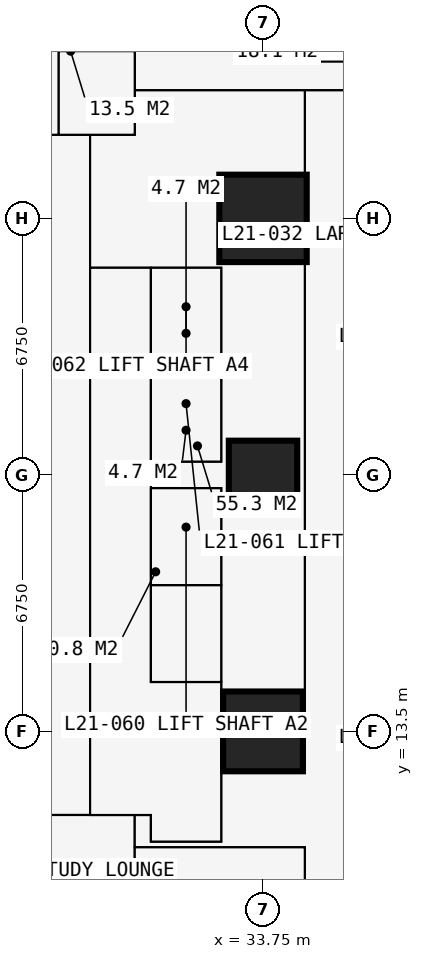
"""IFC4 building model, lengths in metres.
Left out: names, types, materials, properties, quantities, classifications, styles, units other than length and angle.
Written with IfcOpenShell. Run it as: python <this file> out.ifc"""

import sys

from ifc_helpers import new_model, si_unit, direction, frame, frame_2d, origin, origin_2d, place, context, subcontext, project, spatial, rectangle, extrude, element, fill, save


model = new_model("IFC4")
c1 = context("Model", 3, precision=1e-05, world=origin(), true_north=direction((0.0, 1.0)))
c2 = subcontext(c1, "Body", "Model", "MODEL_VIEW")
j1 = project(units=[si_unit("LENGTHUNIT", "METRE"), si_unit("PLANEANGLEUNIT", "RADIAN")], contexts=[c1])
p1 = place(None, origin())
s1 = spatial("IfcSite", under=j1, at=p1, CompositionType="ELEMENT")
p2 = place(p1, origin())
s2 = spatial("IfcBuilding", under=s1, at=p2, CompositionType="ELEMENT")
p3 = place(p2, frame((0.0, 0.0, 80.1)))
s3 = spatial("IfcBuildingStorey", under=s2, at=p3, CompositionType="ELEMENT", Elevation=80.1)
p4 = place(p3, frame((33.75, 13.5, 0.0), z_axis=(0.0, 0.0, 1.0), x_axis=(1.0, 0.0, 0.0)))
e1 = element("IfcColumn", 1, at=p4, inside=s3, PredefinedType="COLUMN", context=c2, shape_type="SweptSolid", body=[
    extrude(rectangle(XDim=2.1, YDim=2.1, at=origin_2d()), origin(), (0.0, 0.0, 1.0), 3.6),
])
p5 = place(p3, frame((33.75, 20.25, 0.0), z_axis=(0.0, 0.0, 1.0), x_axis=(1.0, 0.0, 0.0)))
e2 = element("IfcColumn", 2, at=p5, inside=s3, PredefinedType="COLUMN", context=c2, shape_type="SweptSolid", body=[
    extrude(rectangle(XDim=1.8, YDim=1.8, at=origin_2d()), origin(), (0.0, 0.0, 1.0), 3.6),
])
p6 = place(p3, frame((33.75, 27.0, 0.0), z_axis=(0.0, 0.0, 1.0), x_axis=(1.0, 0.0, 0.0)))
e3 = element("IfcColumn", 3, at=p6, inside=s3, PredefinedType="COLUMN", context=c2, shape_type="SweptSolid", body=[
    extrude(rectangle(XDim=2.3, YDim=2.3, at=origin_2d()), origin(), (0.0, 0.0, 1.0), 3.6),
])
p7 = place(p3, frame((37.875, 31.125, 0.0), z_axis=(0.0, 0.0, 1.0), x_axis=(-1.0, 0.0, 0.0)))
e4 = element("IfcWall", 4, at=p7, inside=s3, PredefinedType="SOLIDWALL", context=c2, shape_type="SweptSolid", body=[
    extrude(rectangle(XDim=3.375, YDim=0.3, at=frame_2d((1.688, 0.0))), origin(), (0.0, 0.0, 1.0), 3.375),
])
p8 = place(p7, frame((0.788, 0.0, 0.6)))
e5 = element("IfcOpeningElement", 5, at=p8, cuts=e4, PredefinedType="OPENING", context=c2, shape_type="SweptSolid", body=[
    extrude(rectangle(XDim=1.8, YDim=2.1, at=frame_2d((0.9, 1.05))), frame((0.0, 0.16, 0.0), z_axis=(0.0, -1.0, 0.0), x_axis=(1.0, 0.0, 0.0)), (0.0, 0.0, 1.0), 0.32),
])
p9 = place(p3, frame((34.5, 31.125, 0.0), z_axis=(0.0, 0.0, 1.0), x_axis=(0.0, 1.0, 0.0)))
e6 = element("IfcWall", 6, at=p9, inside=s3, PredefinedType="SOLIDWALL", context=c2, shape_type="SweptSolid", body=[
    extrude(rectangle(XDim=3.375, YDim=0.3, at=frame_2d((1.688, 0.0))), origin(), (0.0, 0.0, 1.0), 3.375),
])
p10 = place(p9, frame((0.272, 0.0, 0.9)))
e7 = element("IfcOpeningElement", 7, at=p10, cuts=e6, PredefinedType="OPENING", context=c2, shape_type="SweptSolid", body=[
    extrude(rectangle(XDim=0.9, YDim=1.8, at=frame_2d((0.45, 0.9))), frame((0.0, 0.16, 0.0), z_axis=(0.0, -1.0, 0.0), x_axis=(1.0, 0.0, 0.0)), (0.0, 0.0, 1.0), 0.32),
])
p11 = place(p3, frame((10.125, 11.3, 0.0), z_axis=(0.0, 0.0, 1.0), x_axis=(1.0, 0.0, 0.0)))
e8 = element("IfcWall", 8, at=p11, inside=s3, PredefinedType="PARTITIONING", context=c2, shape_type="SweptSolid", body=[
    extrude(rectangle(XDim=20.675, YDim=0.15, at=frame_2d((10.337, 0.0))), origin(), (0.0, 0.0, 1.0), 3.375),
])
p12 = place(p11, frame((11.312, 0.0, 0.0)))
e9 = element("IfcOpeningElement", 9, at=p12, cuts=e8, PredefinedType="OPENING", context=c2, shape_type="SweptSolid", body=[
    extrude(rectangle(XDim=1.0, YDim=2.2, at=frame_2d((0.5, 1.1))), frame((0.0, 0.085, 0.0), z_axis=(0.0, -1.0, 0.0), x_axis=(1.0, 0.0, 0.0)), (0.0, 0.0, 1.0), 0.17),
])
p13 = place(p3, frame((11.3, 29.2, 0.0), z_axis=(0.0, 0.0, 1.0), x_axis=(1.0, 0.0, 0.0)))
e10 = element("IfcWall", 10, at=p13, inside=s3, PredefinedType="PARTITIONING", context=c2, shape_type="SweptSolid", body=[
    extrude(rectangle(XDim=19.075, YDim=0.1, at=frame_2d((9.538, 0.0))), origin(), (0.0, 0.0, 1.0), 3.375),
])
p14 = place(p13, frame((6.4, 0.0, 0.0)))
e11 = element("IfcOpeningElement", 11, at=p14, cuts=e10, PredefinedType="OPENING", context=c2, shape_type="SweptSolid", body=[
    extrude(rectangle(XDim=0.95, YDim=2.2, at=frame_2d((0.475, 1.1))), frame((0.0, 0.06, 0.0), z_axis=(0.0, -1.0, 0.0), x_axis=(1.0, 0.0, 0.0)), (0.0, 0.0, 1.0), 0.12),
])
p15 = place(p13, frame((13.15, 0.0, 0.0)))
e12 = element("IfcOpeningElement", 12, at=p15, cuts=e10, PredefinedType="OPENING", context=c2, shape_type="SweptSolid", body=[
    extrude(rectangle(XDim=0.95, YDim=2.2, at=frame_2d((0.475, 1.1))), frame((0.0, 0.06, 0.0), z_axis=(0.0, -1.0, 0.0), x_axis=(1.0, 0.0, 0.0)), (0.0, 0.0, 1.0), 0.12),
])
p16 = place(p13, frame((15.95, 0.0, 0.0)))
e13 = element("IfcOpeningElement", 13, at=p16, cuts=e10, PredefinedType="OPENING", context=c2, shape_type="SweptSolid", body=[
    extrude(rectangle(XDim=0.95, YDim=2.2, at=frame_2d((0.475, 1.1))), frame((0.0, 0.06, 0.0), z_axis=(0.0, -1.0, 0.0), x_axis=(1.0, 0.0, 0.0)), (0.0, 0.0, 1.0), 0.12),
])
p17 = place(p13, frame((0.6, 0.0, 0.0)))
e14 = element("IfcOpeningElement", 14, at=p17, cuts=e10, PredefinedType="OPENING", context=c2, shape_type="SweptSolid", body=[
    extrude(rectangle(XDim=1.0, YDim=2.2, at=frame_2d((0.5, 1.1))), frame((0.0, 0.06, 0.0), z_axis=(0.0, -1.0, 0.0), x_axis=(1.0, 0.0, 0.0)), (0.0, 0.0, 1.0), 0.12),
])
p18 = place(p3, frame((28.375, 29.2, 0.0), z_axis=(0.0, 0.0, 1.0), x_axis=(0.0, 1.0, 0.0)))
e15 = element("IfcWall", 15, at=p18, inside=s3, PredefinedType="PARTITIONING", context=c2, shape_type="SweptSolid", body=[
    extrude(rectangle(XDim=2.2, YDim=0.1, at=frame_2d((1.1, 0.0))), origin(), (0.0, 0.0, 1.0), 3.375),
])
p19 = place(p18, frame((0.65, 0.0, 0.0)))
e16 = element("IfcOpeningElement", 16, at=p19, cuts=e15, PredefinedType="OPENING", context=c2, shape_type="SweptSolid", body=[
    extrude(rectangle(XDim=0.9, YDim=2.2, at=frame_2d((0.45, 1.1))), frame((0.0, 0.06, 0.0), z_axis=(0.0, -1.0, 0.0), x_axis=(1.0, 0.0, 0.0)), (0.0, 0.0, 1.0), 0.12),
])
p20 = place(p3, frame((28.375, 31.4, 0.0), z_axis=(0.0, 0.0, 1.0), x_axis=(1.0, 0.0, 0.0)))
e17 = element("IfcWall", 17, at=p20, inside=s3, PredefinedType="PARTITIONING", context=c2, shape_type="SweptSolid", body=[
    extrude(rectangle(XDim=2.0, YDim=0.1, at=frame_2d((1.0, 0.0))), origin(), (0.0, 0.0, 1.0), 3.375),
])
p21 = place(p3, frame((29.2, 11.3, 0.0), z_axis=(0.0, 0.0, 1.0), x_axis=(0.0, 1.0, 0.0)))
e18 = element("IfcWall", 18, at=p21, inside=s3, PredefinedType="PARTITIONING", context=c2, shape_type="SweptSolid", body=[
    extrude(rectangle(XDim=17.9, YDim=0.2, at=frame_2d((8.95, 0.0))), origin(), (0.0, 0.0, 1.0), 3.375),
])
p22 = place(p21, frame((8.35, 0.0, 0.0)))
e19 = element("IfcOpeningElement", 19, at=p22, cuts=e18, PredefinedType="OPENING", context=c2, shape_type="SweptSolid", body=[
    extrude(rectangle(XDim=1.2, YDim=2.2, at=frame_2d((0.6, 1.1))), frame((0.0, 0.11, 0.0), z_axis=(0.0, -1.0, 0.0), x_axis=(1.0, 0.0, 0.0)), (0.0, 0.0, 1.0), 0.22),
])
p23 = place(p3, frame((29.2, 25.7, 0.0), z_axis=(0.0, 0.0, 1.0), x_axis=(1.0, 0.0, 0.0)))
e20 = element("IfcWall", 20, at=p23, inside=s3, PredefinedType="SHEAR", context=c2, shape_type="SweptSolid", body=[
    extrude(rectangle(XDim=3.45, YDim=0.1, at=frame_2d((1.725, 0.0))), origin(), (0.0, 0.0, 1.0), 3.375),
])
p24 = place(p3, frame((30.375, -0.734, 0.0), z_axis=(0.0, 0.0, 1.0), x_axis=(0.0, 1.0, 0.0)))
e21 = element("IfcWall", 21, at=p24, inside=s3, PredefinedType="PARTITIONING", context=c2, shape_type="SweptSolid", body=[
    extrude(rectangle(XDim=12.034, YDim=0.15, at=frame_2d((6.017, 0.0))), origin(), (0.0, 0.0, 1.0), 3.375),
])
p25 = place(p24, frame((5.134, 0.0, 0.0)))
e22 = element("IfcOpeningElement", 22, at=p25, cuts=e21, PredefinedType="OPENING", context=c2, shape_type="SweptSolid", body=[
    extrude(rectangle(XDim=1.0, YDim=2.2, at=frame_2d((0.5, 1.1))), frame((0.0, 0.085, 0.0), z_axis=(0.0, -1.0, 0.0), x_axis=(1.0, 0.0, 0.0)), (0.0, 0.0, 1.0), 0.17),
])
p26 = place(p3, frame((30.375, 10.45, 0.0), z_axis=(0.0, 0.0, 1.0), x_axis=(1.0, 0.0, 0.0)))
e23 = element("IfcWall", 23, at=p26, inside=s3, PredefinedType="PARTITIONING", context=c2, shape_type="SweptSolid", body=[
    extrude(rectangle(XDim=4.475, YDim=0.15, at=frame_2d((2.238, 0.0))), origin(), (0.0, 0.0, 1.0), 3.375),
])
p27 = place(p26, frame((2.35, 0.0, 0.0)))
e24 = element("IfcOpeningElement", 24, at=p27, cuts=e23, PredefinedType="OPENING", context=c2, shape_type="SweptSolid", body=[
    extrude(rectangle(XDim=0.95, YDim=2.2, at=frame_2d((0.475, 1.1))), frame((0.0, 0.085, 0.0), z_axis=(0.0, -1.0, 0.0), x_axis=(1.0, 0.0, 0.0)), (0.0, 0.0, 1.0), 0.17),
])
p28 = place(p3, frame((30.375, 29.2, 0.0), z_axis=(0.0, 0.0, 1.0), x_axis=(0.0, 1.0, 0.0)))
e25 = element("IfcWall", 25, at=p28, inside=s3, PredefinedType="PARTITIONING", context=c2, shape_type="SweptSolid", body=[
    extrude(rectangle(XDim=5.284, YDim=0.15, at=frame_2d((2.642, 0.0))), origin(), (0.0, 0.0, 1.0), 3.375),
])
p29 = place(p3, frame((30.375, 30.375, 0.0), z_axis=(0.0, 0.0, 1.0), x_axis=(1.0, 0.0, 0.0)))
e26 = element("IfcWall", 26, at=p29, inside=s3, PredefinedType="PARTITIONING", context=c2, shape_type="SweptSolid", body=[
    extrude(rectangle(XDim=7.35, YDim=0.15, at=frame_2d((3.675, 0.0))), origin(), (0.0, 0.0, 1.0), 2.877),
])
p30 = place(p29, frame((5.125, 0.0, 0.0)))
e27 = element("IfcOpeningElement", 27, at=p30, cuts=e26, PredefinedType="OPENING", context=c2, shape_type="SweptSolid", body=[
    extrude(rectangle(XDim=1.0, YDim=2.2, at=frame_2d((0.5, 1.1))), frame((0.0, 0.085, 0.0), z_axis=(0.0, -1.0, 0.0), x_axis=(1.0, 0.0, 0.0)), (0.0, 0.0, 1.0), 0.17),
])
p31 = place(p3, frame((30.8, 10.6, 0.0), z_axis=(0.0, 0.0, 1.0), x_axis=(0.0, 1.0, 0.0)))
e28 = element("IfcWall", 28, at=p31, inside=s3, PredefinedType="PARTITIONING", context=c2, shape_type="SweptSolid", body=[
    extrude(rectangle(XDim=0.7, YDim=0.15, at=frame_2d((0.35, 0.0))), origin(), (0.0, 0.0, 1.0), 3.375),
])
p32 = place(p3, frame((30.8, 10.6, 0.0), z_axis=(0.0, 0.0, 1.0), x_axis=(1.0, 0.0, 0.0)))
e29 = element("IfcWall", 29, at=p32, inside=s3, PredefinedType="PARTITIONING", context=c2, shape_type="SweptSolid", body=[
    extrude(rectangle(XDim=1.85, YDim=0.15, at=frame_2d((0.925, 0.0))), origin(), (0.0, 0.0, 1.0), 3.375),
])
p33 = place(p3, frame((30.8, 14.8, 0.0), z_axis=(0.0, 0.0, 1.0), x_axis=(0.0, 1.0, 0.0)))
e30 = element("IfcWall", 30, at=p33, inside=s3, PredefinedType="PARTITIONING", context=c2, shape_type="SweptSolid", body=[
    extrude(rectangle(XDim=10.9, YDim=0.15, at=frame_2d((5.45, 0.0))), origin(), (0.0, 0.0, 1.0), 3.375),
])
p34 = place(p33, frame((0.75, 0.0, 0.0)))
e31 = element("IfcOpeningElement", 31, at=p34, cuts=e30, PredefinedType="OPENING", context=c2, shape_type="SweptSolid", body=[
    extrude(rectangle(XDim=1.1, YDim=2.2, at=frame_2d((0.55, 1.1))), frame((0.0, 0.085, 0.0), z_axis=(0.0, -1.0, 0.0), x_axis=(1.0, 0.0, 0.0)), (0.0, 0.0, 1.0), 0.17),
])
p35 = place(p33, frame((3.25, 0.0, 0.0)))
e32 = element("IfcOpeningElement", 32, at=p35, cuts=e30, PredefinedType="OPENING", context=c2, shape_type="SweptSolid", body=[
    extrude(rectangle(XDim=1.1, YDim=2.2, at=frame_2d((0.55, 1.1))), frame((0.0, 0.085, 0.0), z_axis=(0.0, -1.0, 0.0), x_axis=(1.0, 0.0, 0.0)), (0.0, 0.0, 1.0), 0.17),
])
p36 = place(p33, frame((6.5, 0.0, 0.0)))
e33 = element("IfcOpeningElement", 33, at=p36, cuts=e30, PredefinedType="OPENING", context=c2, shape_type="SweptSolid", body=[
    extrude(rectangle(XDim=1.1, YDim=2.2, at=frame_2d((0.55, 1.1))), frame((0.0, 0.085, 0.0), z_axis=(0.0, -1.0, 0.0), x_axis=(1.0, 0.0, 0.0)), (0.0, 0.0, 1.0), 0.17),
])
p37 = place(p33, frame((9.05, 0.0, 0.0)))
e34 = element("IfcOpeningElement", 34, at=p37, cuts=e30, PredefinedType="OPENING", context=c2, shape_type="SweptSolid", body=[
    extrude(rectangle(XDim=1.1, YDim=2.2, at=frame_2d((0.55, 1.1))), frame((0.0, 0.085, 0.0), z_axis=(0.0, -1.0, 0.0), x_axis=(1.0, 0.0, 0.0)), (0.0, 0.0, 1.0), 0.17),
])
for number, where, z_axis, x_axis in (
    (35, (30.8, 14.8, 0.0), (0.0, 0.0, 1.0), (1.0, 0.0, 0.0)),
    (36, (30.8, 17.35, 0.0), (0.0, 0.0, 1.0), (1.0, 0.0, 0.0)),
    (37, (30.8, 19.9, 0.0), (0.0, 0.0, 1.0), (1.0, 0.0, 0.0)),
    (38, (30.8, 20.6, 0.0), (0.0, 0.0, 1.0), (1.0, 0.0, 0.0)),
    (39, (30.8, 23.15, 0.0), (0.0, 0.0, 1.0), (1.0, 0.0, 0.0)),
):
    element("IfcWall", number, at=place(p3, frame(where, z_axis=z_axis, x_axis=x_axis)), inside=s3, PredefinedType="SHEAR", context=c2, shape_type="SweptSolid", body=[
        extrude(rectangle(XDim=1.85, YDim=0.1, at=frame_2d((0.925, 0.0))), origin(), (0.0, 0.0, 1.0), 3.375),
    ])
p38 = place(p3, frame((32.65, 10.6, 0.0), z_axis=(0.0, 0.0, 1.0), x_axis=(0.0, 1.0, 0.0)))
e40 = element("IfcWall", 40, at=p38, inside=s3, PredefinedType="SHEAR", context=c2, shape_type="SweptSolid", body=[
    extrude(rectangle(XDim=9.3, YDim=0.1, at=frame_2d((4.65, 0.0))), origin(), (0.0, 0.0, 1.0), 3.375),
])
p39 = place(p38, frame((0.5, 0.0, 0.0)))
e41 = element("IfcOpeningElement", 41, at=p39, cuts=e40, PredefinedType="OPENING", context=c2, shape_type="SweptSolid", body=[
    extrude(rectangle(XDim=1.0, YDim=2.2, at=frame_2d((0.5, 1.1))), frame((0.0, 0.06, 0.0), z_axis=(0.0, -1.0, 0.0), x_axis=(1.0, 0.0, 0.0)), (0.0, 0.0, 1.0), 0.12),
])
p40 = place(p3, frame((32.65, 12.55, 0.0), z_axis=(0.0, 0.0, 1.0), x_axis=(1.0, 0.0, 0.0)))
e42 = element("IfcWall", 42, at=p40, inside=s3, PredefinedType="PARTITIONING", context=c2, shape_type="SweptSolid", body=[
    extrude(rectangle(XDim=2.2, YDim=0.15, at=frame_2d((1.1, 0.0))), origin(), (0.0, 0.0, 1.0), 3.375),
])
p41 = place(p3, frame((32.65, 20.6, 0.0), z_axis=(0.0, 0.0, 1.0), x_axis=(0.0, 1.0, 0.0)))
e43 = element("IfcWall", 43, at=p41, inside=s3, PredefinedType="PARTITIONING", context=c2, shape_type="SweptSolid", body=[
    extrude(rectangle(XDim=5.1, YDim=0.15, at=frame_2d((2.55, 0.0))), origin(), (0.0, 0.0, 1.0), 3.375),
])
p42 = place(p3, frame((34.85, 6.75, 0.0), z_axis=(0.0, 0.0, 1.0), x_axis=(0.0, 1.0, 0.0)))
e44 = element("IfcWall", 44, at=p42, inside=s3, PredefinedType="PARTITIONING", context=c2, shape_type="SweptSolid", body=[
    extrude(rectangle(XDim=3.7, YDim=0.15, at=frame_2d((1.85, 0.0))), origin(), (0.0, 0.0, 1.0), 3.375),
])
p43 = place(p3, frame((34.85, 12.55, 0.0), z_axis=(0.0, 0.0, 1.0), x_axis=(0.0, 1.0, 0.0)))
e45 = element("IfcWall", 45, at=p43, inside=s3, PredefinedType="PARTITIONING", context=c2, shape_type="SweptSolid", body=[
    extrude(rectangle(XDim=17.825, YDim=0.15, at=frame_2d((8.913, 0.0))), origin(), (0.0, 0.0, 1.0), 3.375),
])
p44 = place(p43, frame((8.6, 0.0, 0.0)))
e46 = element("IfcOpeningElement", 46, at=p44, cuts=e45, PredefinedType="OPENING", context=c2, shape_type="SweptSolid", body=[
    extrude(rectangle(XDim=0.95, YDim=2.2, at=frame_2d((0.475, 1.1))), frame((0.0, 0.085, 0.0), z_axis=(0.0, -1.0, 0.0), x_axis=(1.0, 0.0, 0.0)), (0.0, 0.0, 1.0), 0.17),
])
p45 = place(p8, origin())
e47 = element("IfcWindow", 47, at=p45, inside=s3, PartitioningType="SINGLE_PANEL", PredefinedType="WINDOW", context=c2, shape_type="SweptSolid", body=[
    extrude(rectangle(XDim=1.8, YDim=2.1, at=frame_2d((0.9, 1.05))), frame((0.0, 0.03, 0.0), z_axis=(0.0, -1.0, 0.0), x_axis=(1.0, 0.0, 0.0)), (0.0, 0.0, 1.0), 0.06),
])
fill(e5, e47)
p46 = place(p39, origin())
e48 = element("IfcDoor", 48, at=p46, inside=s3, OperationType="SINGLE_SWING_LEFT", PredefinedType="DOOR", context=c2, shape_type="SweptSolid", body=[
    extrude(rectangle(XDim=1.0, YDim=2.2, at=frame_2d((0.5, 1.1))), frame((0.0, 0.025, 0.0), z_axis=(0.0, -1.0, 0.0), x_axis=(1.0, 0.0, 0.0)), (0.0, 0.0, 1.0), 0.05),
])
fill(e41, e48)
p47 = place(p44, origin())
e49 = element("IfcDoor", 49, at=p47, inside=s3, OperationType="SINGLE_SWING_LEFT", PredefinedType="DOOR", context=c2, shape_type="SweptSolid", body=[
    extrude(rectangle(XDim=0.95, YDim=2.2, at=frame_2d((0.475, 1.1))), frame((0.0, 0.025, 0.0), z_axis=(0.0, -1.0, 0.0), x_axis=(1.0, 0.0, 0.0)), (0.0, 0.0, 1.0), 0.05),
])
fill(e46, e49)
p48 = place(p27, origin())
e50 = element("IfcDoor", 50, at=p48, inside=s3, OperationType="SINGLE_SWING_LEFT", PredefinedType="DOOR", context=c2, shape_type="SweptSolid", body=[
    extrude(rectangle(XDim=0.95, YDim=2.2, at=frame_2d((0.475, 1.1))), frame((0.0, 0.025, 0.0), z_axis=(0.0, -1.0, 0.0), x_axis=(1.0, 0.0, 0.0)), (0.0, 0.0, 1.0), 0.05),
])
fill(e24, e50)
p49 = place(p30, origin())
e51 = element("IfcDoor", 51, at=p49, inside=s3, OperationType="SINGLE_SWING_LEFT", PredefinedType="DOOR", context=c2, shape_type="SweptSolid", body=[
    extrude(rectangle(XDim=1.0, YDim=2.2, at=frame_2d((0.5, 1.1))), frame((0.0, 0.025, 0.0), z_axis=(0.0, -1.0, 0.0), x_axis=(1.0, 0.0, 0.0)), (0.0, 0.0, 1.0), 0.05),
])
fill(e27, e51)
p50 = place(p16, origin())
e52 = element("IfcDoor", 52, at=p50, inside=s3, OperationType="SINGLE_SWING_LEFT", PredefinedType="DOOR", context=c2, shape_type="SweptSolid", body=[
    extrude(rectangle(XDim=0.95, YDim=2.2, at=frame_2d((0.475, 1.1))), frame((0.0, 0.025, 0.0), z_axis=(0.0, -1.0, 0.0), x_axis=(1.0, 0.0, 0.0)), (0.0, 0.0, 1.0), 0.05),
])
fill(e13, e52)
p51 = place(p19, origin())
e53 = element("IfcDoor", 53, at=p51, inside=s3, OperationType="SINGLE_SWING_RIGHT", PredefinedType="DOOR", context=c2, shape_type="SweptSolid", body=[
    extrude(rectangle(XDim=0.9, YDim=2.2, at=frame_2d((0.45, 1.1))), frame((0.0, 0.025, 0.0), z_axis=(0.0, -1.0, 0.0), x_axis=(1.0, 0.0, 0.0)), (0.0, 0.0, 1.0), 0.05),
])
fill(e16, e53)
p52 = place(p34, origin())
e54 = element("IfcDoor", 54, at=p52, inside=s3, OperationType="DOUBLE_DOOR_SLIDING", PredefinedType="DOOR", context=c2, shape_type="SweptSolid", body=[
    extrude(rectangle(XDim=1.1, YDim=2.2, at=frame_2d((0.55, 1.1))), frame((0.0, 0.025, 0.0), z_axis=(0.0, -1.0, 0.0), x_axis=(1.0, 0.0, 0.0)), (0.0, 0.0, 1.0), 0.05),
])
fill(e31, e54)
p53 = place(p35, origin())
e55 = element("IfcDoor", 55, at=p53, inside=s3, OperationType="DOUBLE_DOOR_SLIDING", PredefinedType="DOOR", context=c2, shape_type="SweptSolid", body=[
    extrude(rectangle(XDim=1.1, YDim=2.2, at=frame_2d((0.55, 1.1))), frame((0.0, 0.025, 0.0), z_axis=(0.0, -1.0, 0.0), x_axis=(1.0, 0.0, 0.0)), (0.0, 0.0, 1.0), 0.05),
])
fill(e32, e55)
p54 = place(p36, origin())
e56 = element("IfcDoor", 56, at=p54, inside=s3, OperationType="DOUBLE_DOOR_SLIDING", PredefinedType="DOOR", context=c2, shape_type="SweptSolid", body=[
    extrude(rectangle(XDim=1.1, YDim=2.2, at=frame_2d((0.55, 1.1))), frame((0.0, 0.025, 0.0), z_axis=(0.0, -1.0, 0.0), x_axis=(1.0, 0.0, 0.0)), (0.0, 0.0, 1.0), 0.05),
])
fill(e33, e56)
p55 = place(p37, origin())
e57 = element("IfcDoor", 57, at=p55, inside=s3, OperationType="DOUBLE_DOOR_SLIDING", PredefinedType="DOOR", context=c2, shape_type="SweptSolid", body=[
    extrude(rectangle(XDim=1.1, YDim=2.2, at=frame_2d((0.55, 1.1))), frame((0.0, 0.025, 0.0), z_axis=(0.0, -1.0, 0.0), x_axis=(1.0, 0.0, 0.0)), (0.0, 0.0, 1.0), 0.05),
])
fill(e34, e57)
p56 = place(p22, origin())
e58 = element("IfcDoor", 58, at=p56, inside=s3, OperationType="DOUBLE_DOOR_SINGLE_SWING", PredefinedType="DOOR", context=c2, shape_type="SweptSolid", body=[
    extrude(rectangle(XDim=1.2, YDim=2.2, at=frame_2d((0.6, 1.1))), frame((0.0, 0.025, 0.0), z_axis=(0.0, -1.0, 0.0), x_axis=(1.0, 0.0, 0.0)), (0.0, 0.0, 1.0), 0.05),
])
fill(e19, e58)
save(model, sys.argv[1])
